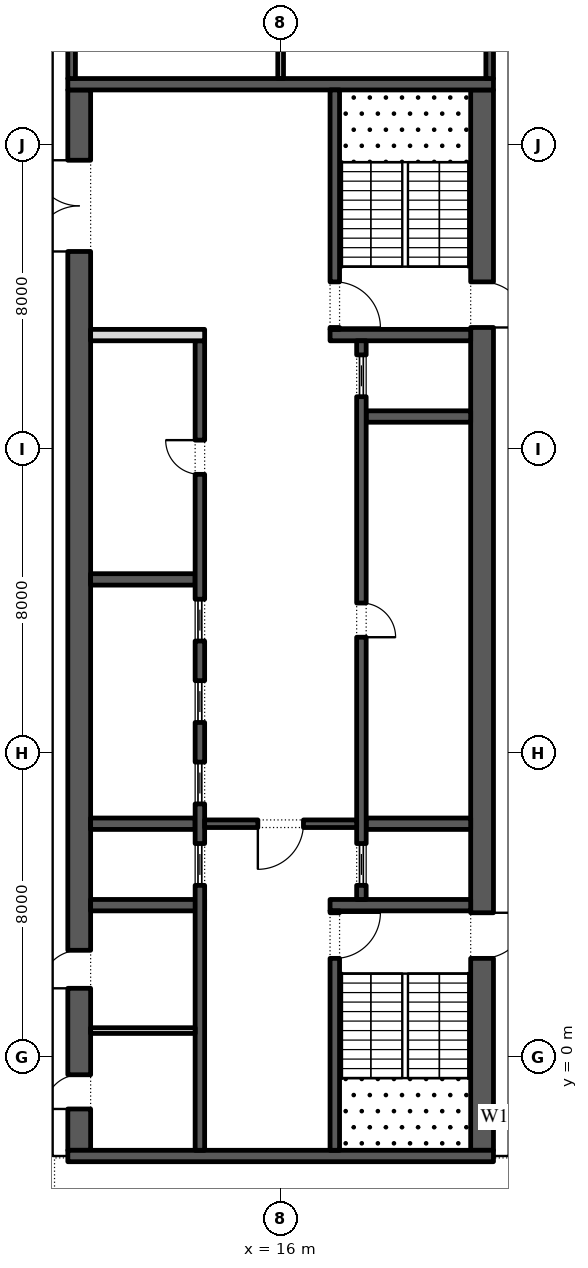
"""IFC4 building model, lengths in metres.
Left out: names, types, materials, properties, quantities, classifications, styles, units other than length and angle.
Written with IfcOpenShell. Run it as: python <this file> out.ifc"""

import sys

from ifc_helpers import new_model, si_unit, direction, frame, frame_2d, origin, place, context, subcontext, project, spatial, rectangle, extrude, element, fill, save


model = new_model("IFC4")
c1 = context("Model", 3, precision=1e-05, world=origin(), true_north=direction((0.0, 1.0)))
c2 = subcontext(c1, "Body", "Model", "MODEL_VIEW")
j1 = project(units=[si_unit("LENGTHUNIT", "METRE"), si_unit("PLANEANGLEUNIT", "RADIAN")], contexts=[c1])
p1 = place(None, origin())
s1 = spatial("IfcSite", under=j1, at=p1, CompositionType="ELEMENT")
p2 = place(p1, origin())
s2 = spatial("IfcBuilding", under=s1, at=p2, CompositionType="ELEMENT")
p3 = place(p2, frame((0.0, 0.0, 243.0)))
s3 = spatial("IfcBuildingStorey", under=s2, at=p3, CompositionType="ELEMENT", Elevation=243.0)
p4 = place(p3, frame((21.359, -11.678, 0.0), z_axis=(0.0, 0.0, 1.0), x_axis=(0.224949198343, 0.974370493275, 0.0)))
e1 = element("IfcWall", 1, at=p4, inside=s3, PredefinedType="STANDARD", context=c2, shape_type="SweptSolid", body=[
    extrude(rectangle(XDim=49.5, YDim=0.3, at=frame_2d((24.75, 0.0))), origin(), (0.0, 0.0, 1.0), 4.0),
])
p5 = place(p4, frame((1.157, 0.0, 0.45)))
e2 = element("IfcOpeningElement", 2, at=p5, cuts=e1, PredefinedType="OPENING", context=c2, shape_type="SweptSolid", body=[
    extrude(rectangle(XDim=4.5, YDim=3.05, at=frame_2d((2.25, 1.525))), frame((0.0, 0.16, 0.0), z_axis=(0.0, -1.0, 0.0), x_axis=(1.0, 0.0, 0.0)), (0.0, 0.0, 1.0), 0.32),
])
p6 = place(p4, frame((8.121, 0.0, 0.45)))
e3 = element("IfcOpeningElement", 3, at=p6, cuts=e1, PredefinedType="OPENING", context=c2, shape_type="SweptSolid", body=[
    extrude(rectangle(XDim=4.5, YDim=3.05, at=frame_2d((2.25, 1.525))), frame((0.0, 0.16, 0.0), z_axis=(0.0, -1.0, 0.0), x_axis=(1.0, 0.0, 0.0)), (0.0, 0.0, 1.0), 0.32),
])
p7 = place(p4, frame((15.236, 0.0, 0.45)))
e4 = element("IfcOpeningElement", 4, at=p7, cuts=e1, PredefinedType="OPENING", context=c2, shape_type="SweptSolid", body=[
    extrude(rectangle(XDim=4.5, YDim=3.05, at=frame_2d((2.25, 1.525))), frame((0.0, 0.16, 0.0), z_axis=(0.0, -1.0, 0.0), x_axis=(1.0, 0.0, 0.0)), (0.0, 0.0, 1.0), 0.32),
])
p8 = place(p4, frame((22.35, 0.0, 0.45)))
e5 = element("IfcOpeningElement", 5, at=p8, cuts=e1, PredefinedType="OPENING", context=c2, shape_type="SweptSolid", body=[
    extrude(rectangle(XDim=4.5, YDim=3.05, at=frame_2d((2.25, 1.525))), frame((0.0, 0.16, 0.0), z_axis=(0.0, -1.0, 0.0), x_axis=(1.0, 0.0, 0.0)), (0.0, 0.0, 1.0), 0.32),
])
p9 = place(p4, frame((29.464, 0.0, 0.45)))
e6 = element("IfcOpeningElement", 6, at=p9, cuts=e1, PredefinedType="OPENING", context=c2, shape_type="SweptSolid", body=[
    extrude(rectangle(XDim=4.5, YDim=2.95, at=frame_2d((2.25, 1.475))), frame((0.0, 0.16, 0.0), z_axis=(0.0, -1.0, 0.0), x_axis=(1.0, 0.0, 0.0)), (0.0, 0.0, 1.0), 0.32),
])
p10 = place(p4, frame((37.628, 0.0, 0.0)))
e7 = element("IfcOpeningElement", 7, at=p10, cuts=e1, PredefinedType="OPENING", context=c2, shape_type="SweptSolid", body=[
    extrude(rectangle(XDim=2.4, YDim=3.325, at=frame_2d((1.2, 1.663))), frame((0.0, 0.16, 0.0), z_axis=(0.0, -1.0, 0.0), x_axis=(1.0, 0.0, 0.0)), (0.0, 0.0, 1.0), 0.32),
])
p11 = place(p4, frame((43.693, 0.0, 0.45)))
e8 = element("IfcOpeningElement", 8, at=p11, cuts=e1, PredefinedType="OPENING", context=c2, shape_type="SweptSolid", body=[
    extrude(rectangle(XDim=4.5, YDim=3.05, at=frame_2d((2.25, 1.525))), frame((0.0, 0.16, 0.0), z_axis=(0.0, -1.0, 0.0), x_axis=(1.0, 0.0, 0.0)), (0.0, 0.0, 1.0), 0.32),
])
p12 = place(p3, frame((21.3, -2.45, 0.0), z_axis=(0.0, 0.0, 1.0), x_axis=(0.0, 1.0, 0.0)))
e9 = element("IfcWall", 9, at=p12, inside=s3, PredefinedType="SHEAR", context=c2, shape_type="SweptSolid", body=[
    extrude(rectangle(XDim=27.9, YDim=0.6, at=frame_2d((13.95, 0.0))), origin(), (0.0, 0.0, 1.0), 4.0),
])
p13 = place(p12, frame((5.05, 0.0, 0.0)))
e10 = element("IfcOpeningElement", 10, at=p13, cuts=e9, PredefinedType="OPENING", context=c2, shape_type="SweptSolid", body=[
    extrude(rectangle(XDim=1.2, YDim=2.1, at=frame_2d((0.6, 1.05))), frame((0.0, 0.31, 0.0), z_axis=(0.0, -1.0, 0.0), x_axis=(1.0, 0.0, 0.0)), (0.0, 0.0, 1.0), 0.62),
])
p14 = place(p12, frame((21.65, 0.0, 0.0)))
e11 = element("IfcOpeningElement", 11, at=p14, cuts=e9, PredefinedType="OPENING", context=c2, shape_type="SweptSolid", body=[
    extrude(rectangle(XDim=1.2, YDim=2.1, at=frame_2d((0.6, 1.05))), frame((0.0, 0.31, 0.0), z_axis=(0.0, -1.0, 0.0), x_axis=(1.0, 0.0, 0.0)), (0.0, 0.0, 1.0), 0.62),
])
p15 = place(p3, frame((10.7, -2.45, 0.0), z_axis=(0.0, 0.0, 1.0), x_axis=(0.0, 1.0, 0.0)))
e12 = element("IfcWall", 12, at=p15, inside=s3, PredefinedType="SHEAR", context=c2, shape_type="SweptSolid", body=[
    extrude(rectangle(XDim=27.9, YDim=0.6, at=frame_2d((13.95, 0.0))), origin(), (0.0, 0.0, 1.0), 4.0),
])
p16 = place(p15, frame((23.65, 0.0, 0.0)))
e13 = element("IfcOpeningElement", 13, at=p16, cuts=e12, PredefinedType="OPENING", context=c2, shape_type="SweptSolid", body=[
    extrude(rectangle(XDim=2.4, YDim=2.1, at=frame_2d((1.2, 1.05))), frame((0.0, 0.31, 0.0), z_axis=(0.0, -1.0, 0.0), x_axis=(1.0, 0.0, 0.0)), (0.0, 0.0, 1.0), 0.62),
])
p17 = place(p15, frame((1.087, 0.0, 0.0)))
e14 = element("IfcOpeningElement", 14, at=p17, cuts=e12, PredefinedType="OPENING", context=c2, shape_type="SweptSolid", body=[
    extrude(rectangle(XDim=0.9, YDim=2.1, at=frame_2d((0.45, 1.05))), frame((0.0, 0.31, 0.0), z_axis=(0.0, -1.0, 0.0), x_axis=(1.0, 0.0, 0.0)), (0.0, 0.0, 1.0), 0.62),
])
p18 = place(p15, frame((4.262, 0.0, 0.0)))
e15 = element("IfcOpeningElement", 15, at=p18, cuts=e12, PredefinedType="OPENING", context=c2, shape_type="SweptSolid", body=[
    extrude(rectangle(XDim=1.0, YDim=2.1, at=frame_2d((0.5, 1.05))), frame((0.0, 0.31, 0.0), z_axis=(0.0, -1.0, 0.0), x_axis=(1.0, 0.0, 0.0)), (0.0, 0.0, 1.0), 0.62),
])
for number, where, z_axis, x_axis in (
    (16, (10.4, -2.6, 0.0), (0.0, 0.0, 1.0), (1.0, 0.0, 0.0)),
    (17, (10.4, 25.6, 0.0), (0.0, 0.0, 1.0), (1.0, 0.0, 0.0)),
):
    element("IfcWall", number, at=place(p3, frame(where, z_axis=z_axis, x_axis=x_axis)), inside=s3, PredefinedType="SHEAR", context=c2, shape_type="SweptSolid", body=[
        extrude(rectangle(XDim=11.2, YDim=0.3, at=frame_2d((5.6, 0.0))), origin(), (0.0, 0.0, 1.0), 4.0),
    ])
p19 = place(p3, frame((17.3, 4.0, 0.0), z_axis=(0.0, 0.0, 1.0), x_axis=(1.0, 0.0, 0.0)))
e18 = element("IfcWall", 18, at=p19, inside=s3, PredefinedType="SHEAR", context=c2, shape_type="SweptSolid", body=[
    extrude(rectangle(XDim=3.7, YDim=0.3, at=frame_2d((1.85, 0.0))), origin(), (0.0, 0.0, 1.0), 4.0),
])
p20 = place(p3, frame((17.425, -2.45, 0.0), z_axis=(0.0, 0.0, 1.0), x_axis=(0.0, 1.0, 0.0)))
e19 = element("IfcWall", 19, at=p20, inside=s3, PredefinedType="SHEAR", context=c2, shape_type="SweptSolid", body=[
    extrude(rectangle(XDim=6.3, YDim=0.25, at=frame_2d((3.15, 0.0))), origin(), (0.0, 0.0, 1.0), 4.0),
])
p21 = place(p20, frame((5.05, 0.0, 0.0)))
e20 = element("IfcOpeningElement", 20, at=p21, cuts=e19, PredefinedType="OPENING", context=c2, shape_type="SweptSolid", body=[
    extrude(rectangle(XDim=1.2, YDim=2.1, at=frame_2d((0.6, 1.05))), frame((0.0, 0.135, 0.0), z_axis=(0.0, -1.0, 0.0), x_axis=(1.0, 0.0, 0.0)), (0.0, 0.0, 1.0), 0.27),
])
p22 = place(p3, frame((17.3, 19.0, 0.0), z_axis=(0.0, 0.0, 1.0), x_axis=(1.0, 0.0, 0.0)))
e21 = element("IfcWall", 21, at=p22, inside=s3, PredefinedType="SHEAR", context=c2, shape_type="SweptSolid", body=[
    extrude(rectangle(XDim=3.7, YDim=0.3, at=frame_2d((1.85, 0.0))), origin(), (0.0, 0.0, 1.0), 4.0),
])
p23 = place(p3, frame((17.425, 19.15, 0.0), z_axis=(0.0, 0.0, 1.0), x_axis=(0.0, 1.0, 0.0)))
e22 = element("IfcWall", 22, at=p23, inside=s3, PredefinedType="SHEAR", context=c2, shape_type="SweptSolid", body=[
    extrude(rectangle(XDim=6.3, YDim=0.25, at=frame_2d((3.15, 0.0))), origin(), (0.0, 0.0, 1.0), 4.0),
])
p24 = place(p23, frame((0.05, 0.0, 0.0)))
e23 = element("IfcOpeningElement", 23, at=p24, cuts=e22, PredefinedType="OPENING", context=c2, shape_type="SweptSolid", body=[
    extrude(rectangle(XDim=1.2, YDim=2.1, at=frame_2d((0.6, 1.05))), frame((0.0, 0.135, 0.0), z_axis=(0.0, -1.0, 0.0), x_axis=(1.0, 0.0, 0.0)), (0.0, 0.0, 1.0), 0.27),
])
for number, where, z_axis, x_axis in (
    (24, (18.25, 6.143, 0.0), (0.0, 0.0, 1.0), (1.0, 0.0, 0.0)),
    (25, (18.25, 16.857, 0.0), (0.0, 0.0, 1.0), (1.0, 0.0, 0.0)),
):
    element("IfcWall", number, at=place(p3, frame(where, z_axis=z_axis, x_axis=x_axis)), inside=s3, PredefinedType="SHEAR", context=c2, shape_type="SweptSolid", body=[
        extrude(rectangle(XDim=2.75, YDim=0.3, at=frame_2d((1.375, 0.0))), origin(), (0.0, 0.0, 1.0), 4.0),
    ])
p25 = place(p3, frame((18.125, 4.15, 0.0), z_axis=(0.0, 0.0, 1.0), x_axis=(0.0, 1.0, 0.0)))
e26 = element("IfcWall", 26, at=p25, inside=s3, PredefinedType="SHEAR", context=c2, shape_type="SweptSolid", body=[
    extrude(rectangle(XDim=14.7, YDim=0.25, at=frame_2d((7.35, 0.0))), origin(), (0.0, 0.0, 1.0), 4.0),
])
p26 = place(p25, frame((6.9, 0.0, 0.0)))
e27 = element("IfcOpeningElement", 27, at=p26, cuts=e26, PredefinedType="OPENING", context=c2, shape_type="SweptSolid", body=[
    extrude(rectangle(XDim=0.9, YDim=2.1, at=frame_2d((0.45, 1.05))), frame((0.0, 0.135, 0.0), z_axis=(0.0, -1.0, 0.0), x_axis=(1.0, 0.0, 0.0)), (0.0, 0.0, 1.0), 0.27),
])
p27 = place(p25, frame((0.371, 0.0, 0.0)))
e28 = element("IfcOpeningElement", 28, at=p27, cuts=e26, PredefinedType="OPENING", context=c2, shape_type="SweptSolid", body=[
    extrude(rectangle(XDim=1.1, YDim=2.1, at=frame_2d((0.55, 1.05))), frame((0.0, 0.135, 0.0), z_axis=(0.0, -1.0, 0.0), x_axis=(1.0, 0.0, 0.0)), (0.0, 0.0, 1.0), 0.27),
])
p28 = place(p25, frame((13.229, 0.0, 0.0)))
e29 = element("IfcOpeningElement", 29, at=p28, cuts=e26, PredefinedType="OPENING", context=c2, shape_type="SweptSolid", body=[
    extrude(rectangle(XDim=1.1, YDim=2.1, at=frame_2d((0.55, 1.05))), frame((0.0, 0.135, 0.0), z_axis=(0.0, -1.0, 0.0), x_axis=(1.0, 0.0, 0.0)), (0.0, 0.0, 1.0), 0.27),
])
p29 = place(p3, frame((11.0, 4.0, 0.0), z_axis=(0.0, 0.0, 1.0), x_axis=(1.0, 0.0, 0.0)))
e30 = element("IfcWall", 30, at=p29, inside=s3, PredefinedType="SHEAR", context=c2, shape_type="SweptSolid", body=[
    extrude(rectangle(XDim=3.0, YDim=0.3, at=frame_2d((1.5, 0.0))), origin(), (0.0, 0.0, 1.0), 4.0),
])
for number, where, z_axis, x_axis in (
    (31, (11.0, 6.143, 0.0), (0.0, 0.0, 1.0), (1.0, 0.0, 0.0)),
    (32, (11.0, 12.571, 0.0), (0.0, 0.0, 1.0), (1.0, 0.0, 0.0)),
):
    element("IfcWall", number, at=place(p3, frame(where, z_axis=z_axis, x_axis=x_axis)), inside=s3, PredefinedType="SHEAR", context=c2, shape_type="SweptSolid", body=[
        extrude(rectangle(XDim=2.75, YDim=0.3, at=frame_2d((1.375, 0.0))), origin(), (0.0, 0.0, 1.0), 4.0),
    ])
p30 = place(p3, frame((13.875, -2.45, 0.0), z_axis=(0.0, 0.0, 1.0), x_axis=(0.0, 1.0, 0.0)))
e33 = element("IfcWall", 33, at=p30, inside=s3, PredefinedType="SHEAR", context=c2, shape_type="SweptSolid", body=[
    extrude(rectangle(XDim=21.3, YDim=0.25, at=frame_2d((10.65, 0.0))), origin(), (0.0, 0.0, 1.0), 4.0),
])
p31 = place(p30, frame((17.786, 0.0, 0.0)))
e34 = element("IfcOpeningElement", 34, at=p31, cuts=e33, PredefinedType="OPENING", context=c2, shape_type="SweptSolid", body=[
    extrude(rectangle(XDim=0.9, YDim=2.1, at=frame_2d((0.45, 1.05))), frame((0.0, 0.135, 0.0), z_axis=(0.0, -1.0, 0.0), x_axis=(1.0, 0.0, 0.0)), (0.0, 0.0, 1.0), 0.27),
])
p32 = place(p30, frame((6.971, 0.0, 0.0)))
e35 = element("IfcOpeningElement", 35, at=p32, cuts=e33, PredefinedType="OPENING", context=c2, shape_type="SweptSolid", body=[
    extrude(rectangle(XDim=1.1, YDim=2.1, at=frame_2d((0.55, 1.05))), frame((0.0, 0.135, 0.0), z_axis=(0.0, -1.0, 0.0), x_axis=(1.0, 0.0, 0.0)), (0.0, 0.0, 1.0), 0.27),
])
p33 = place(p30, frame((9.114, 0.0, 0.0)))
e36 = element("IfcOpeningElement", 36, at=p33, cuts=e33, PredefinedType="OPENING", context=c2, shape_type="SweptSolid", body=[
    extrude(rectangle(XDim=1.1, YDim=2.1, at=frame_2d((0.55, 1.05))), frame((0.0, 0.135, 0.0), z_axis=(0.0, -1.0, 0.0), x_axis=(1.0, 0.0, 0.0)), (0.0, 0.0, 1.0), 0.27),
])
p34 = place(p30, frame((11.257, 0.0, 0.0)))
e37 = element("IfcOpeningElement", 37, at=p34, cuts=e33, PredefinedType="OPENING", context=c2, shape_type="SweptSolid", body=[
    extrude(rectangle(XDim=1.1, YDim=2.1, at=frame_2d((0.55, 1.05))), frame((0.0, 0.135, 0.0), z_axis=(0.0, -1.0, 0.0), x_axis=(1.0, 0.0, 0.0)), (0.0, 0.0, 1.0), 0.27),
])
p35 = place(p30, frame((13.4, 0.0, 0.0)))
e38 = element("IfcOpeningElement", 38, at=p35, cuts=e33, PredefinedType="OPENING", context=c2, shape_type="SweptSolid", body=[
    extrude(rectangle(XDim=1.1, YDim=2.1, at=frame_2d((0.55, 1.05))), frame((0.0, 0.135, 0.0), z_axis=(0.0, -1.0, 0.0), x_axis=(1.0, 0.0, 0.0)), (0.0, 0.0, 1.0), 0.27),
])
p36 = place(p3, frame((11.0, 19.0, 0.0), z_axis=(0.0, 0.0, 1.0), x_axis=(1.0, 0.0, 0.0)))
e39 = element("IfcWall", 39, at=p36, inside=s3, PredefinedType="PARTITIONING", context=c2, shape_type="SweptSolid", body=[
    extrude(rectangle(XDim=3.0, YDim=0.3, at=frame_2d((1.5, 0.0))), origin(), (0.0, 0.0, 1.0), 4.0),
])
p37 = place(p3, frame((14.0, 6.143, 0.0), z_axis=(0.0, 0.0, 1.0), x_axis=(1.0, 0.0, 0.0)))
e40 = element("IfcWall", 40, at=p37, inside=s3, PredefinedType="SHEAR", context=c2, shape_type="SweptSolid", body=[
    extrude(rectangle(XDim=4.0, YDim=0.2, at=frame_2d((2.0, 0.0))), origin(), (0.0, 0.0, 1.0), 4.0),
])
p38 = place(p37, frame((1.4, 0.0, 0.0)))
e41 = element("IfcOpeningElement", 41, at=p38, cuts=e40, PredefinedType="OPENING", context=c2, shape_type="SweptSolid", body=[
    extrude(rectangle(XDim=1.2, YDim=2.1, at=frame_2d((0.6, 1.05))), frame((0.0, 0.11, 0.0), z_axis=(0.0, -1.0, 0.0), x_axis=(1.0, 0.0, 0.0)), (0.0, 0.0, 1.0), 0.22),
])
p39 = place(p3, frame((11.0, 0.7, 0.0), z_axis=(0.0, 0.0, 1.0), x_axis=(1.0, 0.0, 0.0)))
e42 = element("IfcWall", 42, at=p39, inside=s3, PredefinedType="PARTITIONING", context=c2, shape_type="SweptSolid", body=[
    extrude(rectangle(XDim=2.75, YDim=0.15, at=frame_2d((1.375, 0.0))), origin(), (0.0, 0.0, 1.0), 4.0),
])
p40 = place(p3, frame((21.5, 25.75, 0.0), z_axis=(0.0, 0.0, 1.0), x_axis=(0.0, 1.0, 0.0)))
e43 = element("IfcWall", 43, at=p40, inside=s3, PredefinedType="SHEAR", context=c2, shape_type="SweptSolid", body=[
    extrude(rectangle(XDim=4.75, YDim=0.2, at=frame_2d((2.375, 0.0))), origin(), (0.0, 0.0, 1.0), 4.0),
])
p41 = place(p40, frame((1.925, 0.0, 0.0)))
e44 = element("IfcOpeningElement", 44, at=p41, cuts=e43, PredefinedType="OPENING", context=c2, shape_type="SweptSolid", body=[
    extrude(rectangle(XDim=0.9, YDim=2.1, at=frame_2d((0.45, 1.05))), frame((0.0, 0.11, 0.0), z_axis=(0.0, -1.0, 0.0), x_axis=(1.0, 0.0, 0.0)), (0.0, 0.0, 1.0), 0.22),
])
p42 = place(p3, frame((10.5, 25.75, 0.0), z_axis=(0.0, 0.0, 1.0), x_axis=(0.0, 1.0, 0.0)))
e45 = element("IfcWall", 45, at=p42, inside=s3, PredefinedType="SHEAR", context=c2, shape_type="SweptSolid", body=[
    extrude(rectangle(XDim=4.75, YDim=0.2, at=frame_2d((2.375, 0.0))), origin(), (0.0, 0.0, 1.0), 4.0),
])
p43 = place(p42, frame((1.925, 0.0, 0.0)))
e46 = element("IfcOpeningElement", 46, at=p43, cuts=e45, PredefinedType="OPENING", context=c2, shape_type="SweptSolid", body=[
    extrude(rectangle(XDim=0.9, YDim=2.1, at=frame_2d((0.45, 1.05))), frame((0.0, 0.11, 0.0), z_axis=(0.0, -1.0, 0.0), x_axis=(1.0, 0.0, 0.0)), (0.0, 0.0, 1.0), 0.22),
])
p44 = place(p3, frame((16.0, 25.75, 0.0), z_axis=(0.0, 0.0, 1.0), x_axis=(0.0, 1.0, 0.0)))
e47 = element("IfcWall", 47, at=p44, inside=s3, PredefinedType="PARTITIONING", context=c2, shape_type="SweptSolid", body=[
    extrude(rectangle(XDim=4.75, YDim=0.15, at=frame_2d((2.375, 0.0))), origin(), (0.0, 0.0, 1.0), 4.0),
])
p45 = place(p26, frame((0.9, -0.2, 0.0), z_axis=(0.0, 0.0, 1.0), x_axis=(-1.0, 0.0, 0.0)))
e48 = element("IfcDoor", 48, at=p45, inside=s3, OperationType="SINGLE_SWING_LEFT", PredefinedType="DOOR", context=c2, shape_type="SweptSolid", body=[
    extrude(rectangle(XDim=0.9, YDim=2.1, at=frame_2d((0.45, 1.05))), frame((0.0, -0.075, 0.0), z_axis=(0.0, -1.0, 0.0), x_axis=(1.0, 0.0, 0.0)), (0.0, 0.0, 1.0), 0.05),
])
fill(e27, e48)
p46 = place(p27, origin())
e49 = element("IfcDoor", 49, at=p46, inside=s3, OperationType="SLIDING_TO_LEFT", PredefinedType="DOOR", context=c2, shape_type="SweptSolid", body=[
    extrude(rectangle(XDim=1.1, YDim=2.1, at=frame_2d((0.55, 1.05))), frame((0.0, 0.025, 0.0), z_axis=(0.0, -1.0, 0.0), x_axis=(1.0, 0.0, 0.0)), (0.0, 0.0, 1.0), 0.05),
])
fill(e28, e49)
p47 = place(p28, origin())
e50 = element("IfcDoor", 50, at=p47, inside=s3, OperationType="SLIDING_TO_LEFT", PredefinedType="DOOR", context=c2, shape_type="SweptSolid", body=[
    extrude(rectangle(XDim=1.1, YDim=2.1, at=frame_2d((0.55, 1.05))), frame((0.0, 0.025, 0.0), z_axis=(0.0, -1.0, 0.0), x_axis=(1.0, 0.0, 0.0)), (0.0, 0.0, 1.0), 0.05),
])
fill(e29, e50)
p48 = place(p31, origin())
e51 = element("IfcDoor", 51, at=p48, inside=s3, OperationType="SINGLE_SWING_LEFT", PredefinedType="DOOR", context=c2, shape_type="SweptSolid", body=[
    extrude(rectangle(XDim=0.9, YDim=2.1, at=frame_2d((0.45, 1.05))), frame((0.0, 0.125, 0.0), z_axis=(0.0, -1.0, 0.0), x_axis=(1.0, 0.0, 0.0)), (0.0, 0.0, 1.0), 0.05),
])
fill(e34, e51)
p49 = place(p32, origin())
e52 = element("IfcDoor", 52, at=p49, inside=s3, OperationType="SLIDING_TO_LEFT", PredefinedType="DOOR", context=c2, shape_type="SweptSolid", body=[
    extrude(rectangle(XDim=1.1, YDim=2.1, at=frame_2d((0.55, 1.05))), frame((0.0, 0.025, 0.0), z_axis=(0.0, -1.0, 0.0), x_axis=(1.0, 0.0, 0.0)), (0.0, 0.0, 1.0), 0.05),
])
fill(e35, e52)
p50 = place(p33, origin())
e53 = element("IfcDoor", 53, at=p50, inside=s3, OperationType="SLIDING_TO_LEFT", PredefinedType="DOOR", context=c2, shape_type="SweptSolid", body=[
    extrude(rectangle(XDim=1.1, YDim=2.1, at=frame_2d((0.55, 1.05))), frame((0.0, 0.025, 0.0), z_axis=(0.0, -1.0, 0.0), x_axis=(1.0, 0.0, 0.0)), (0.0, 0.0, 1.0), 0.05),
])
fill(e36, e53)
p51 = place(p34, origin())
e54 = element("IfcDoor", 54, at=p51, inside=s3, OperationType="SLIDING_TO_LEFT", PredefinedType="DOOR", context=c2, shape_type="SweptSolid", body=[
    extrude(rectangle(XDim=1.1, YDim=2.1, at=frame_2d((0.55, 1.05))), frame((0.0, 0.025, 0.0), z_axis=(0.0, -1.0, 0.0), x_axis=(1.0, 0.0, 0.0)), (0.0, 0.0, 1.0), 0.05),
])
fill(e37, e54)
p52 = place(p35, origin())
e55 = element("IfcDoor", 55, at=p52, inside=s3, OperationType="SLIDING_TO_LEFT", PredefinedType="DOOR", context=c2, shape_type="SweptSolid", body=[
    extrude(rectangle(XDim=1.1, YDim=2.1, at=frame_2d((0.55, 1.05))), frame((0.0, 0.025, 0.0), z_axis=(0.0, -1.0, 0.0), x_axis=(1.0, 0.0, 0.0)), (0.0, 0.0, 1.0), 0.05),
])
fill(e38, e55)
p53 = place(p38, frame((1.2, 0.0, 0.0), z_axis=(0.0, 0.0, 1.0), x_axis=(-1.0, 0.0, 0.0)))
e56 = element("IfcDoor", 56, at=p53, inside=s3, OperationType="SINGLE_SWING_LEFT", PredefinedType="DOOR", context=c2, shape_type="SweptSolid", body=[
    extrude(rectangle(XDim=1.2, YDim=2.1, at=frame_2d((0.6, 1.05))), frame((0.0, 0.025, 0.0), z_axis=(0.0, -1.0, 0.0), x_axis=(1.0, 0.0, 0.0)), (0.0, 0.0, 1.0), 0.05),
])
fill(e41, e56)
p54 = place(p16, origin())
e57 = element("IfcDoor", 57, at=p54, inside=s3, OperationType="DOUBLE_DOOR_SINGLE_SWING", PredefinedType="DOOR", context=c2, shape_type="SweptSolid", body=[
    extrude(rectangle(XDim=2.4, YDim=2.1, at=frame_2d((1.2, 1.05))), frame((0.0, 0.025, 0.0), z_axis=(0.0, -1.0, 0.0), x_axis=(1.0, 0.0, 0.0)), (0.0, 0.0, 1.0), 0.05),
])
fill(e13, e57)
p55 = place(p21, frame((1.2, 0.0, 0.0), z_axis=(0.0, 0.0, 1.0), x_axis=(-1.0, 0.0, 0.0)))
e58 = element("IfcDoor", 58, at=p55, inside=s3, OperationType="SINGLE_SWING_RIGHT", PredefinedType="DOOR", context=c2, shape_type="SweptSolid", body=[
    extrude(rectangle(XDim=1.2, YDim=2.1, at=frame_2d((0.6, 1.05))), frame((0.0, 0.025, 0.0), z_axis=(0.0, -1.0, 0.0), x_axis=(1.0, 0.0, 0.0)), (0.0, 0.0, 1.0), 0.05),
])
fill(e20, e58)
p56 = place(p13, frame((1.2, 0.0, 0.0), z_axis=(0.0, 0.0, 1.0), x_axis=(-1.0, 0.0, 0.0)))
e59 = element("IfcDoor", 59, at=p56, inside=s3, OperationType="SINGLE_SWING_RIGHT", PredefinedType="DOOR", context=c2, shape_type="SweptSolid", body=[
    extrude(rectangle(XDim=1.2, YDim=2.1, at=frame_2d((0.6, 1.05))), frame((0.0, 0.025, 0.0), z_axis=(0.0, -1.0, 0.0), x_axis=(1.0, 0.0, 0.0)), (0.0, 0.0, 1.0), 0.05),
])
fill(e10, e59)
p57 = place(p24, frame((1.2, 0.0, 0.0), z_axis=(0.0, 0.0, 1.0), x_axis=(-1.0, 0.0, 0.0)))
e60 = element("IfcDoor", 60, at=p57, inside=s3, OperationType="SINGLE_SWING_LEFT", PredefinedType="DOOR", context=c2, shape_type="SweptSolid", body=[
    extrude(rectangle(XDim=1.2, YDim=2.1, at=frame_2d((0.6, 1.05))), frame((0.0, 0.025, 0.0), z_axis=(0.0, -1.0, 0.0), x_axis=(1.0, 0.0, 0.0)), (0.0, 0.0, 1.0), 0.05),
])
fill(e23, e60)
p58 = place(p14, frame((1.2, 0.0, 0.0), z_axis=(0.0, 0.0, 1.0), x_axis=(-1.0, 0.0, 0.0)))
e61 = element("IfcDoor", 61, at=p58, inside=s3, OperationType="SINGLE_SWING_LEFT", PredefinedType="DOOR", context=c2, shape_type="SweptSolid", body=[
    extrude(rectangle(XDim=1.2, YDim=2.1, at=frame_2d((0.6, 1.05))), frame((0.0, 0.025, 0.0), z_axis=(0.0, -1.0, 0.0), x_axis=(1.0, 0.0, 0.0)), (0.0, 0.0, 1.0), 0.05),
])
fill(e11, e61)
p59 = place(p17, origin())
e62 = element("IfcDoor", 62, at=p59, inside=s3, OperationType="SINGLE_SWING_RIGHT", PredefinedType="DOOR", context=c2, shape_type="SweptSolid", body=[
    extrude(rectangle(XDim=0.9, YDim=2.1, at=frame_2d((0.45, 1.05))), frame((0.0, -0.25, 0.0), z_axis=(0.0, -1.0, 0.0), x_axis=(1.0, 0.0, 0.0)), (0.0, 0.0, 1.0), 0.05),
])
fill(e14, e62)
p60 = place(p18, origin())
e63 = element("IfcDoor", 63, at=p60, inside=s3, OperationType="SINGLE_SWING_RIGHT", PredefinedType="DOOR", context=c2, shape_type="SweptSolid", body=[
    extrude(rectangle(XDim=1.0, YDim=2.1, at=frame_2d((0.5, 1.05))), frame((0.0, -0.25, 0.0), z_axis=(0.0, -1.0, 0.0), x_axis=(1.0, 0.0, 0.0)), (0.0, 0.0, 1.0), 0.05),
])
fill(e15, e63)
save(model, sys.argv[1])
